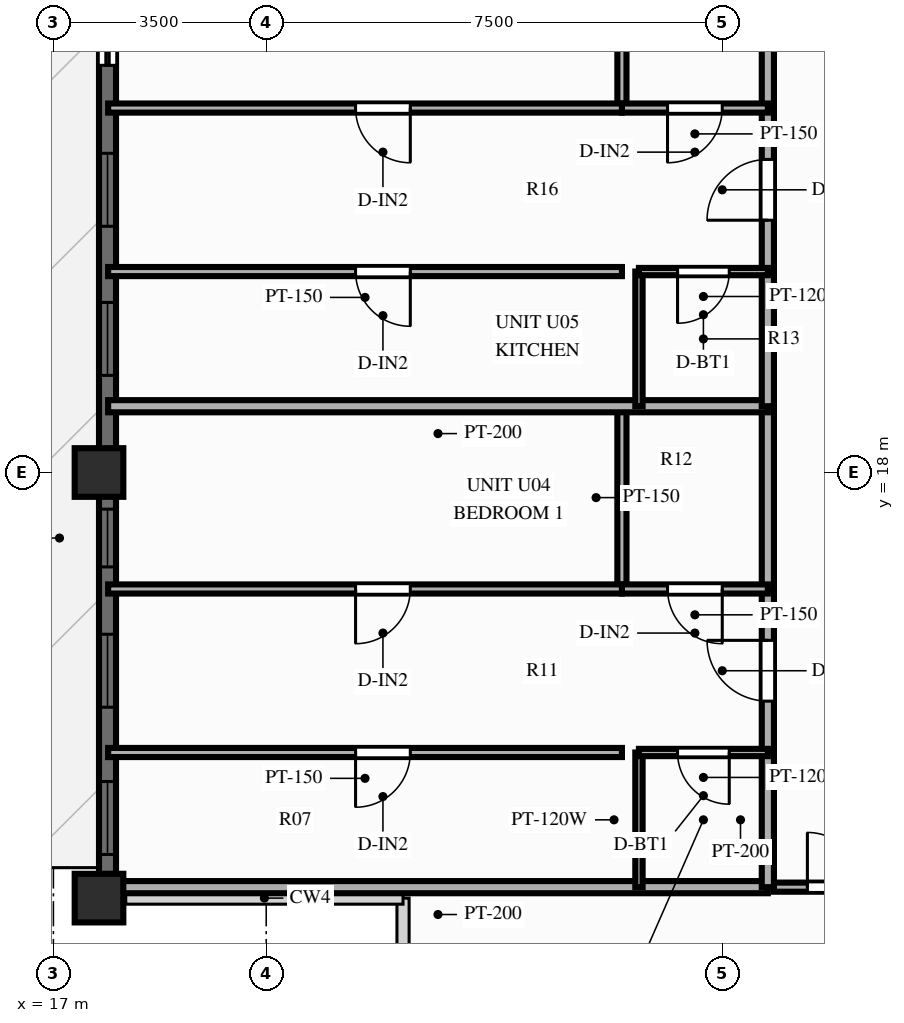
"""IFC4 building model, lengths in metres.
Left out: names, types, materials, properties, quantities, classifications, styles, units other than length and angle.
Written with IfcOpenShell. Run it as: python <this file> out.ifc"""

import sys

from ifc_helpers import new_model, si_unit, direction, frame, frame_2d, origin, origin_2d, place, context, subcontext, project, spatial, rectangle, extrude, source, transform, mapped, element, fill, save


model = new_model("IFC4")
c1 = context("Model", 3, precision=1e-05, world=origin(), true_north=direction((0.0, 1.0)))
c2 = subcontext(c1, "Body", "Model", "MODEL_VIEW")
j1 = project(units=[si_unit("LENGTHUNIT", "METRE"), si_unit("PLANEANGLEUNIT", "RADIAN")], contexts=[c1])
p1 = place(None, origin())
s1 = spatial("IfcSite", under=j1, at=p1, CompositionType="ELEMENT")
p2 = place(p1, origin())
s2 = spatial("IfcBuilding", under=s1, at=p2, CompositionType="ELEMENT")
p3 = place(p2, frame((0.0, 0.0, 186.7)))
s3 = spatial("IfcBuildingStorey", under=s2, at=p3, CompositionType="ELEMENT", Elevation=186.7)
m1 = source(origin(), c2, "Body", "SweptSolid", [
    extrude(rectangle(XDim=0.8, YDim=0.8, at=origin_2d()), origin(), (0.0, 0.0, 1.0), 3.0),
])
for number, where, z_axis, x_axis in (
    (1, (17.75, 18.0, 0.0), (0.0, 0.0, 1.0), (1.0, 0.0, 0.0)),
    (2, (17.75, 11.0, 0.0), (0.0, 0.0, 1.0), (1.0, 0.0, 0.0)),
):
    element("IfcColumn", number, at=place(p3, frame(where, z_axis=z_axis, x_axis=x_axis)), inside=s3, PredefinedType="COLUMN", context=c2, shape_type="MappedRepresentation", body=[
        mapped(m1, transform((0.0, 0.0, 0.0), scale=1.0)),
    ])
p4 = place(p3, frame((17.89, 11.0, 0.0), z_axis=(0.0, 0.0, 1.0), x_axis=(0.0, 1.0, 0.0)))
e3 = element("IfcWall", 3, at=p4, inside=s3, PredefinedType="SOLIDWALL", context=c2, shape_type="SweptSolid", body=[
    extrude(rectangle(XDim=32.0, YDim=0.28, at=frame_2d((16.0, 0.0))), origin(), (0.0, 0.0, 1.0), 2.28),
])
p5 = place(p4, frame((0.717, 0.0, 0.25)))
e4 = element("IfcOpeningElement", 4, at=p5, cuts=e3, PredefinedType="OPENING", context=c2, shape_type="SweptSolid", body=[
    extrude(rectangle(XDim=1.2, YDim=1.5, at=frame_2d((0.6, 0.75))), frame((0.0, 0.152, 0.0), z_axis=(0.0, -1.0, 0.0), x_axis=(1.0, 0.0, 0.0)), (0.0, 0.0, 1.0), 0.304),
])
p6 = place(p4, frame((3.139, 0.0, 0.25)))
e5 = element("IfcOpeningElement", 5, at=p6, cuts=e3, PredefinedType="OPENING", context=c2, shape_type="SweptSolid", body=[
    extrude(rectangle(XDim=1.2, YDim=1.5, at=frame_2d((0.6, 0.75))), frame((0.0, 0.152, 0.0), z_axis=(0.0, -1.0, 0.0), x_axis=(1.0, 0.0, 0.0)), (0.0, 0.0, 1.0), 0.304),
])
p7 = place(p4, frame((5.447, 0.0, 0.25)))
e6 = element("IfcOpeningElement", 6, at=p7, cuts=e3, PredefinedType="OPENING", context=c2, shape_type="SweptSolid", body=[
    extrude(rectangle(XDim=0.95, YDim=1.5, at=frame_2d((0.475, 0.75))), frame((0.0, 0.152, 0.0), z_axis=(0.0, -1.0, 0.0), x_axis=(1.0, 0.0, 0.0)), (0.0, 0.0, 1.0), 0.304),
])
p8 = place(p4, frame((8.597, 0.0, 0.25)))
e7 = element("IfcOpeningElement", 7, at=p8, cuts=e3, PredefinedType="OPENING", context=c2, shape_type="SweptSolid", body=[
    extrude(rectangle(XDim=1.2, YDim=1.5, at=frame_2d((0.6, 0.75))), frame((0.0, 0.152, 0.0), z_axis=(0.0, -1.0, 0.0), x_axis=(1.0, 0.0, 0.0)), (0.0, 0.0, 1.0), 0.304),
])
p9 = place(p4, frame((11.05, 0.0, 0.25)))
e8 = element("IfcOpeningElement", 8, at=p9, cuts=e3, PredefinedType="OPENING", context=c2, shape_type="SweptSolid", body=[
    extrude(rectangle(XDim=1.2, YDim=1.5, at=frame_2d((0.6, 0.75))), frame((0.0, 0.152, 0.0), z_axis=(0.0, -1.0, 0.0), x_axis=(1.0, 0.0, 0.0)), (0.0, 0.0, 1.0), 0.304),
])
p10 = place(p4, frame((13.697, 0.0, 0.0)))
e9 = element("IfcOpeningElement", 9, at=p10, cuts=e3, PredefinedType="OPENING", context=c2, shape_type="SweptSolid", body=[
    extrude(rectangle(XDim=1.6, YDim=2.15, at=frame_2d((0.8, 1.075))), frame((0.0, 0.152, 0.0), z_axis=(0.0, -1.0, 0.0), x_axis=(1.0, 0.0, 0.0)), (0.0, 0.0, 1.0), 0.304),
])
p11 = place(p4, frame((16.507, 0.0, 0.25)))
e10 = element("IfcOpeningElement", 10, at=p11, cuts=e3, PredefinedType="OPENING", context=c2, shape_type="SweptSolid", body=[
    extrude(rectangle(XDim=1.2, YDim=1.5, at=frame_2d((0.6, 0.75))), frame((0.0, 0.152, 0.0), z_axis=(0.0, -1.0, 0.0), x_axis=(1.0, 0.0, 0.0)), (0.0, 0.0, 1.0), 0.304),
])
p12 = place(p4, frame((18.959, 0.0, 0.25)))
e11 = element("IfcOpeningElement", 11, at=p12, cuts=e3, PredefinedType="OPENING", context=c2, shape_type="SweptSolid", body=[
    extrude(rectangle(XDim=1.2, YDim=1.5, at=frame_2d((0.6, 0.75))), frame((0.0, 0.152, 0.0), z_axis=(0.0, -1.0, 0.0), x_axis=(1.0, 0.0, 0.0)), (0.0, 0.0, 1.0), 0.304),
])
p13 = place(p4, frame((21.807, 0.0, 0.25)))
e12 = element("IfcOpeningElement", 12, at=p13, cuts=e3, PredefinedType="OPENING", context=c2, shape_type="SweptSolid", body=[
    extrude(rectangle(XDim=1.2, YDim=1.5, at=frame_2d((0.6, 0.75))), frame((0.0, 0.152, 0.0), z_axis=(0.0, -1.0, 0.0), x_axis=(1.0, 0.0, 0.0)), (0.0, 0.0, 1.0), 0.304),
])
p14 = place(p4, frame((26.967, 0.0, 0.25)))
e13 = element("IfcOpeningElement", 13, at=p14, cuts=e3, PredefinedType="OPENING", context=c2, shape_type="SweptSolid", body=[
    extrude(rectangle(XDim=1.2, YDim=1.5, at=frame_2d((0.6, 0.75))), frame((0.0, 0.152, 0.0), z_axis=(0.0, -1.0, 0.0), x_axis=(1.0, 0.0, 0.0)), (0.0, 0.0, 1.0), 0.304),
])
p15 = place(p4, frame((29.687, 0.0, 0.25)))
e14 = element("IfcOpeningElement", 14, at=p15, cuts=e3, PredefinedType="OPENING", context=c2, shape_type="SweptSolid", body=[
    extrude(rectangle(XDim=1.2, YDim=1.5, at=frame_2d((0.6, 0.75))), frame((0.0, 0.152, 0.0), z_axis=(0.0, -1.0, 0.0), x_axis=(1.0, 0.0, 0.0)), (0.0, 0.0, 1.0), 0.304),
])
p16 = place(p3, frame((28.85, 11.18, 0.0), z_axis=(0.0, 0.0, 1.0), x_axis=(1.0, 0.0, 0.0)))
e15 = element("IfcWall", 15, at=p16, inside=s3, PredefinedType="PARTITIONING", context=c2, shape_type="SweptSolid", body=[
    extrude(rectangle(XDim=2.33, YDim=0.15, at=frame_2d((1.165, 0.0))), origin(), (0.0, 0.0, 1.0), 2.79),
])
p17 = place(p16, frame((0.55, 0.0, 0.0)))
e16 = element("IfcOpeningElement", 16, at=p17, cuts=e15, PredefinedType="OPENING", context=c2, shape_type="SweptSolid", body=[
    extrude(rectangle(XDim=0.9, YDim=2.1, at=frame_2d((0.45, 1.05))), frame((0.0, 0.087, 0.0), z_axis=(0.0, -1.0, 0.0), x_axis=(1.0, 0.0, 0.0)), (0.0, 0.0, 1.0), 0.174),
])
p18 = place(p3, frame((28.75, 11.18, 0.0), z_axis=(0.0, 0.0, 1.0), x_axis=(-1.0, 0.0, 0.0)))
e17 = element("IfcWall", 17, at=p18, inside=s3, PredefinedType="PARTITIONING", context=c2, shape_type="SweptSolid", body=[
    extrude(rectangle(XDim=10.85, YDim=0.2, at=frame_2d((5.425, 0.0))), origin(), (0.0, 0.0, 1.0), 2.79),
])
p19 = place(p3, frame((28.75, 11.18, 0.0), z_axis=(0.0, 0.0, 1.0), x_axis=(0.0, 1.0, 0.0)))
e18 = element("IfcWall", 18, at=p19, inside=s3, PredefinedType="PARTITIONING", context=c2, shape_type="SweptSolid", body=[
    extrude(rectangle(XDim=2.215, YDim=0.2, at=frame_2d((1.107, 0.0))), origin(), (0.0, 0.0, 1.0), 2.79),
])
p20 = place(p3, frame((28.75, 13.395, 0.0), z_axis=(0.0, 0.0, 1.0), x_axis=(0.0, 1.0, 0.0)))
e19 = element("IfcWall", 19, at=p20, inside=s3, PredefinedType="PARTITIONING", context=c2, shape_type="SweptSolid", body=[
    extrude(rectangle(XDim=2.689, YDim=0.2, at=frame_2d((1.345, 0.0))), origin(), (0.0, 0.0, 1.0), 2.79),
])
p21 = place(p20, frame((0.845, 0.0, 0.0)))
e20 = element("IfcOpeningElement", 20, at=p21, cuts=e19, PredefinedType="OPENING", context=c2, shape_type="SweptSolid", body=[
    extrude(rectangle(XDim=1.0, YDim=2.15, at=frame_2d((0.5, 1.075))), frame((0.0, 0.112, 0.0), z_axis=(0.0, -1.0, 0.0), x_axis=(1.0, 0.0, 0.0)), (0.0, 0.0, 1.0), 0.224),
])
p22 = place(p3, frame((28.75, 16.084, 0.0), z_axis=(0.0, 0.0, 1.0), x_axis=(0.0, 1.0, 0.0)))
e21 = element("IfcWall", 21, at=p22, inside=s3, PredefinedType="PARTITIONING", context=c2, shape_type="SweptSolid", body=[
    extrude(rectangle(XDim=3.006, YDim=0.2, at=frame_2d((1.503, 0.0))), origin(), (0.0, 0.0, 1.0), 2.79),
])
p23 = place(p3, frame((26.63, 11.18, 0.0), z_axis=(0.0, 0.0, 1.0), x_axis=(0.0, 1.0, 0.0)))
e22 = element("IfcWall", 22, at=p23, inside=s3, PredefinedType="PARTITIONING", context=c2, shape_type="SweptSolid", body=[
    extrude(rectangle(XDim=2.215, YDim=0.12, at=frame_2d((1.107, 0.0))), origin(), (0.0, 0.0, 1.0), 2.79),
])
p24 = place(p3, frame((26.35, 16.084, 0.0), z_axis=(0.0, 0.0, 1.0), x_axis=(0.0, 1.0, 0.0)))
e23 = element("IfcWall", 23, at=p24, inside=s3, PredefinedType="PARTITIONING", context=c2, shape_type="SweptSolid", body=[
    extrude(rectangle(XDim=3.006, YDim=0.15, at=frame_2d((1.503, 0.0))), origin(), (0.0, 0.0, 1.0), 2.79),
])
p25 = place(p3, frame((28.75, 13.395, 0.0), z_axis=(0.0, 0.0, 1.0), x_axis=(-1.0, 0.0, 0.0)))
e24 = element("IfcWall", 24, at=p25, inside=s3, PredefinedType="PARTITIONING", context=c2, shape_type="SweptSolid", body=[
    extrude(rectangle(XDim=2.12, YDim=0.12, at=frame_2d((1.06, 0.0))), origin(), (0.0, 0.0, 1.0), 2.79),
])
p26 = place(p25, frame((0.635, 0.0, 0.0)))
e25 = element("IfcOpeningElement", 25, at=p26, cuts=e24, PredefinedType="OPENING", context=c2, shape_type="SweptSolid", body=[
    extrude(rectangle(XDim=0.85, YDim=2.05, at=frame_2d((0.425, 1.025))), frame((0.0, 0.072, 0.0), z_axis=(0.0, -1.0, 0.0), x_axis=(1.0, 0.0, 0.0)), (0.0, 0.0, 1.0), 0.144),
])
p27 = place(p3, frame((26.35, 13.395, 0.0), z_axis=(0.0, 0.0, 1.0), x_axis=(-1.0, 0.0, 0.0)))
e26 = element("IfcWall", 26, at=p27, inside=s3, PredefinedType="PARTITIONING", context=c2, shape_type="SweptSolid", body=[
    extrude(rectangle(XDim=8.45, YDim=0.15, at=frame_2d((4.225, 0.0))), origin(), (0.0, 0.0, 1.0), 2.79),
])
p28 = place(p27, frame((3.48, 0.0, 0.0)))
e27 = element("IfcOpeningElement", 27, at=p28, cuts=e26, PredefinedType="OPENING", context=c2, shape_type="SweptSolid", body=[
    extrude(rectangle(XDim=0.9, YDim=2.1, at=frame_2d((0.45, 1.05))), frame((0.0, 0.087, 0.0), z_axis=(0.0, -1.0, 0.0), x_axis=(1.0, 0.0, 0.0)), (0.0, 0.0, 1.0), 0.174),
])
p29 = place(p3, frame((28.75, 16.084, 0.0), z_axis=(0.0, 0.0, 1.0), x_axis=(-1.0, 0.0, 0.0)))
e28 = element("IfcWall", 28, at=p29, inside=s3, PredefinedType="PARTITIONING", context=c2, shape_type="SweptSolid", body=[
    extrude(rectangle(XDim=2.4, YDim=0.15, at=frame_2d((1.2, 0.0))), origin(), (0.0, 0.0, 1.0), 2.79),
])
p30 = place(p29, frame((0.75, 0.0, 0.0)))
e29 = element("IfcOpeningElement", 29, at=p30, cuts=e28, PredefinedType="OPENING", context=c2, shape_type="SweptSolid", body=[
    extrude(rectangle(XDim=0.9, YDim=2.1, at=frame_2d((0.45, 1.05))), frame((0.0, 0.087, 0.0), z_axis=(0.0, -1.0, 0.0), x_axis=(1.0, 0.0, 0.0)), (0.0, 0.0, 1.0), 0.174),
])
p31 = place(p3, frame((26.35, 16.084, 0.0), z_axis=(0.0, 0.0, 1.0), x_axis=(-1.0, 0.0, 0.0)))
e30 = element("IfcWall", 30, at=p31, inside=s3, PredefinedType="PARTITIONING", context=c2, shape_type="SweptSolid", body=[
    extrude(rectangle(XDim=8.45, YDim=0.15, at=frame_2d((4.225, 0.0))), origin(), (0.0, 0.0, 1.0), 2.79),
])
p32 = place(p31, frame((3.48, 0.0, 0.0)))
e31 = element("IfcOpeningElement", 31, at=p32, cuts=e30, PredefinedType="OPENING", context=c2, shape_type="SweptSolid", body=[
    extrude(rectangle(XDim=0.9, YDim=2.1, at=frame_2d((0.45, 1.05))), frame((0.0, 0.087, 0.0), z_axis=(0.0, -1.0, 0.0), x_axis=(1.0, 0.0, 0.0)), (0.0, 0.0, 1.0), 0.174),
])
p33 = place(p3, frame((28.75, 19.09, 0.0), z_axis=(0.0, 0.0, 1.0), x_axis=(-1.0, 0.0, 0.0)))
e32 = element("IfcWall", 32, at=p33, inside=s3, PredefinedType="PARTITIONING", context=c2, shape_type="SweptSolid", body=[
    extrude(rectangle(XDim=10.85, YDim=0.2, at=frame_2d((5.425, 0.0))), origin(), (0.0, 0.0, 1.0), 2.79),
])
p34 = place(p3, frame((28.75, 19.09, 0.0), z_axis=(0.0, 0.0, 1.0), x_axis=(0.0, 1.0, 0.0)))
e33 = element("IfcWall", 33, at=p34, inside=s3, PredefinedType="PARTITIONING", context=c2, shape_type="SweptSolid", body=[
    extrude(rectangle(XDim=2.215, YDim=0.2, at=frame_2d((1.107, 0.0))), origin(), (0.0, 0.0, 1.0), 2.79),
])
p35 = place(p3, frame((28.75, 21.305, 0.0), z_axis=(0.0, 0.0, 1.0), x_axis=(0.0, 1.0, 0.0)))
e34 = element("IfcWall", 34, at=p35, inside=s3, PredefinedType="PARTITIONING", context=c2, shape_type="SweptSolid", body=[
    extrude(rectangle(XDim=2.689, YDim=0.2, at=frame_2d((1.345, 0.0))), origin(), (0.0, 0.0, 1.0), 2.79),
])
p36 = place(p35, frame((0.845, 0.0, 0.0)))
e35 = element("IfcOpeningElement", 35, at=p36, cuts=e34, PredefinedType="OPENING", context=c2, shape_type="SweptSolid", body=[
    extrude(rectangle(XDim=1.0, YDim=2.15, at=frame_2d((0.5, 1.075))), frame((0.0, 0.112, 0.0), z_axis=(0.0, -1.0, 0.0), x_axis=(1.0, 0.0, 0.0)), (0.0, 0.0, 1.0), 0.224),
])
p37 = place(p3, frame((28.75, 23.994, 0.0), z_axis=(0.0, 0.0, 1.0), x_axis=(0.0, 1.0, 0.0)))
e36 = element("IfcWall", 36, at=p37, inside=s3, PredefinedType="PARTITIONING", context=c2, shape_type="SweptSolid", body=[
    extrude(rectangle(XDim=3.006, YDim=0.2, at=frame_2d((1.503, 0.0))), origin(), (0.0, 0.0, 1.0), 2.79),
])
p38 = place(p3, frame((26.63, 19.09, 0.0), z_axis=(0.0, 0.0, 1.0), x_axis=(0.0, 1.0, 0.0)))
e37 = element("IfcWall", 37, at=p38, inside=s3, PredefinedType="PARTITIONING", context=c2, shape_type="SweptSolid", body=[
    extrude(rectangle(XDim=2.215, YDim=0.12, at=frame_2d((1.107, 0.0))), origin(), (0.0, 0.0, 1.0), 2.79),
])
p39 = place(p3, frame((26.35, 23.994, 0.0), z_axis=(0.0, 0.0, 1.0), x_axis=(0.0, 1.0, 0.0)))
e38 = element("IfcWall", 38, at=p39, inside=s3, PredefinedType="PARTITIONING", context=c2, shape_type="SweptSolid", body=[
    extrude(rectangle(XDim=3.006, YDim=0.15, at=frame_2d((1.503, 0.0))), origin(), (0.0, 0.0, 1.0), 2.79),
])
p40 = place(p3, frame((28.75, 21.305, 0.0), z_axis=(0.0, 0.0, 1.0), x_axis=(-1.0, 0.0, 0.0)))
e39 = element("IfcWall", 39, at=p40, inside=s3, PredefinedType="PARTITIONING", context=c2, shape_type="SweptSolid", body=[
    extrude(rectangle(XDim=2.12, YDim=0.12, at=frame_2d((1.06, 0.0))), origin(), (0.0, 0.0, 1.0), 2.79),
])
p41 = place(p40, frame((0.635, 0.0, 0.0)))
e40 = element("IfcOpeningElement", 40, at=p41, cuts=e39, PredefinedType="OPENING", context=c2, shape_type="SweptSolid", body=[
    extrude(rectangle(XDim=0.85, YDim=2.05, at=frame_2d((0.425, 1.025))), frame((0.0, 0.072, 0.0), z_axis=(0.0, -1.0, 0.0), x_axis=(1.0, 0.0, 0.0)), (0.0, 0.0, 1.0), 0.144),
])
p42 = place(p3, frame((26.35, 21.305, 0.0), z_axis=(0.0, 0.0, 1.0), x_axis=(-1.0, 0.0, 0.0)))
e41 = element("IfcWall", 41, at=p42, inside=s3, PredefinedType="PARTITIONING", context=c2, shape_type="SweptSolid", body=[
    extrude(rectangle(XDim=8.45, YDim=0.15, at=frame_2d((4.225, 0.0))), origin(), (0.0, 0.0, 1.0), 2.79),
])
p43 = place(p42, frame((3.48, 0.0, 0.0)))
e42 = element("IfcOpeningElement", 42, at=p43, cuts=e41, PredefinedType="OPENING", context=c2, shape_type="SweptSolid", body=[
    extrude(rectangle(XDim=0.9, YDim=2.1, at=frame_2d((0.45, 1.05))), frame((0.0, 0.087, 0.0), z_axis=(0.0, -1.0, 0.0), x_axis=(1.0, 0.0, 0.0)), (0.0, 0.0, 1.0), 0.174),
])
p44 = place(p3, frame((28.75, 23.994, 0.0), z_axis=(0.0, 0.0, 1.0), x_axis=(-1.0, 0.0, 0.0)))
e43 = element("IfcWall", 43, at=p44, inside=s3, PredefinedType="PARTITIONING", context=c2, shape_type="SweptSolid", body=[
    extrude(rectangle(XDim=2.4, YDim=0.15, at=frame_2d((1.2, 0.0))), origin(), (0.0, 0.0, 1.0), 2.79),
])
p45 = place(p44, frame((0.75, 0.0, 0.0)))
e44 = element("IfcOpeningElement", 44, at=p45, cuts=e43, PredefinedType="OPENING", context=c2, shape_type="SweptSolid", body=[
    extrude(rectangle(XDim=0.9, YDim=2.1, at=frame_2d((0.45, 1.05))), frame((0.0, 0.087, 0.0), z_axis=(0.0, -1.0, 0.0), x_axis=(1.0, 0.0, 0.0)), (0.0, 0.0, 1.0), 0.174),
])
p46 = place(p3, frame((26.35, 23.994, 0.0), z_axis=(0.0, 0.0, 1.0), x_axis=(-1.0, 0.0, 0.0)))
e45 = element("IfcWall", 45, at=p46, inside=s3, PredefinedType="PARTITIONING", context=c2, shape_type="SweptSolid", body=[
    extrude(rectangle(XDim=8.45, YDim=0.15, at=frame_2d((4.225, 0.0))), origin(), (0.0, 0.0, 1.0), 2.79),
])
p47 = place(p46, frame((3.48, 0.0, 0.0)))
e46 = element("IfcOpeningElement", 46, at=p47, cuts=e45, PredefinedType="OPENING", context=c2, shape_type="SweptSolid", body=[
    extrude(rectangle(XDim=0.9, YDim=2.1, at=frame_2d((0.45, 1.05))), frame((0.0, 0.087, 0.0), z_axis=(0.0, -1.0, 0.0), x_axis=(1.0, 0.0, 0.0)), (0.0, 0.0, 1.0), 0.174),
])
m2 = source(origin(), c2, "Body", "SweptSolid", [
    extrude(rectangle(XDim=1.2, YDim=1.5, at=frame_2d((0.6, 0.75))), frame((0.0, 0.03, 0.0), z_axis=(0.0, -1.0, 0.0), x_axis=(1.0, 0.0, 0.0)), (0.0, 0.0, 1.0), 0.06),
])
p48 = place(p5, origin())
e47 = element("IfcWindow", 47, at=p48, inside=s3, PartitioningType="SINGLE_PANEL", PredefinedType="WINDOW", context=c2, shape_type="MappedRepresentation", body=[
    mapped(m2, transform((0.0, 0.0, 0.0), scale=1.0)),
])
fill(e4, e47)
p49 = place(p6, origin())
e48 = element("IfcWindow", 48, at=p49, inside=s3, PartitioningType="SINGLE_PANEL", PredefinedType="WINDOW", context=c2, shape_type="MappedRepresentation", body=[
    mapped(m2, transform((0.0, 0.0, 0.0), scale=1.0)),
])
fill(e5, e48)
m3 = source(origin(), c2, "Body", "SweptSolid", [
    extrude(rectangle(XDim=0.95, YDim=1.5, at=frame_2d((0.475, 0.75))), frame((0.0, 0.03, 0.0), z_axis=(0.0, -1.0, 0.0), x_axis=(1.0, 0.0, 0.0)), (0.0, 0.0, 1.0), 0.06),
])
p50 = place(p7, origin())
e49 = element("IfcWindow", 49, at=p50, inside=s3, PartitioningType="SINGLE_PANEL", PredefinedType="WINDOW", context=c2, shape_type="MappedRepresentation", body=[
    mapped(m3, transform((0.0, 0.0, 0.0), scale=1.0)),
])
fill(e6, e49)
p51 = place(p8, origin())
e50 = element("IfcWindow", 50, at=p51, inside=s3, PartitioningType="SINGLE_PANEL", PredefinedType="WINDOW", context=c2, shape_type="MappedRepresentation", body=[
    mapped(m2, transform((0.0, 0.0, 0.0), scale=1.0)),
])
fill(e7, e50)
p52 = place(p9, origin())
e51 = element("IfcWindow", 51, at=p52, inside=s3, PartitioningType="SINGLE_PANEL", PredefinedType="WINDOW", context=c2, shape_type="MappedRepresentation", body=[
    mapped(m2, transform((0.0, 0.0, 0.0), scale=1.0)),
])
fill(e8, e51)
m4 = source(origin(), c2, "Body", "SweptSolid", [
    extrude(rectangle(XDim=1.6, YDim=2.15, at=frame_2d((0.8, 1.075))), frame((0.0, 0.025, 0.0), z_axis=(0.0, -1.0, 0.0), x_axis=(1.0, 0.0, 0.0)), (0.0, 0.0, 1.0), 0.05),
])
p53 = place(p10, origin())
e52 = element("IfcDoor", 52, at=p53, inside=s3, OperationType="SLIDING_TO_LEFT", PredefinedType="DOOR", context=c2, shape_type="MappedRepresentation", body=[
    mapped(m4, transform((0.0, 0.0, 0.0), scale=1.0)),
])
fill(e9, e52)
m5 = source(origin(), c2, "Body", "SweptSolid", [
    extrude(rectangle(XDim=0.9, YDim=2.1, at=frame_2d((0.45, 1.05))), frame((0.0, 0.025, 0.0), z_axis=(0.0, -1.0, 0.0), x_axis=(1.0, 0.0, 0.0)), (0.0, 0.0, 1.0), 0.05),
])
p54 = place(p17, origin())
e53 = element("IfcDoor", 53, at=p54, inside=s3, OperationType="SINGLE_SWING_LEFT", PredefinedType="DOOR", context=c2, shape_type="MappedRepresentation", body=[
    mapped(m5, transform((0.0, 0.0, 0.0), scale=1.0)),
])
fill(e16, e53)
m6 = source(origin(), c2, "Body", "SweptSolid", [
    extrude(rectangle(XDim=1.0, YDim=2.15, at=frame_2d((0.5, 1.075))), frame((0.0, 0.025, 0.0), z_axis=(0.0, -1.0, 0.0), x_axis=(1.0, 0.0, 0.0)), (0.0, 0.0, 1.0), 0.05),
])
p55 = place(p21, origin())
e54 = element("IfcDoor", 54, at=p55, inside=s3, OperationType="SINGLE_SWING_RIGHT", PredefinedType="DOOR", context=c2, shape_type="MappedRepresentation", body=[
    mapped(m6, transform((0.0, 0.0, 0.0), scale=1.0)),
])
fill(e20, e54)
m7 = source(origin(), c2, "Body", "SweptSolid", [
    extrude(rectangle(XDim=0.85, YDim=2.05, at=frame_2d((0.425, 1.025))), frame((0.0, 0.025, 0.0), z_axis=(0.0, -1.0, 0.0), x_axis=(1.0, 0.0, 0.0)), (0.0, 0.0, 1.0), 0.05),
])
p56 = place(p26, origin())
e55 = element("IfcDoor", 55, at=p56, inside=s3, OperationType="SINGLE_SWING_LEFT", PredefinedType="DOOR", context=c2, shape_type="MappedRepresentation", body=[
    mapped(m7, transform((0.0, 0.0, 0.0), scale=1.0)),
])
fill(e25, e55)
p57 = place(p28, origin())
e56 = element("IfcDoor", 56, at=p57, inside=s3, OperationType="SINGLE_SWING_RIGHT", PredefinedType="DOOR", context=c2, shape_type="MappedRepresentation", body=[
    mapped(m5, transform((0.0, 0.0, 0.0), scale=1.0)),
])
fill(e27, e56)
p58 = place(p30, origin())
e57 = element("IfcDoor", 57, at=p58, inside=s3, OperationType="SINGLE_SWING_LEFT", PredefinedType="DOOR", context=c2, shape_type="MappedRepresentation", body=[
    mapped(m5, transform((0.0, 0.0, 0.0), scale=1.0)),
])
fill(e29, e57)
p59 = place(p32, origin())
e58 = element("IfcDoor", 58, at=p59, inside=s3, OperationType="SINGLE_SWING_RIGHT", PredefinedType="DOOR", context=c2, shape_type="MappedRepresentation", body=[
    mapped(m5, transform((0.0, 0.0, 0.0), scale=1.0)),
])
fill(e31, e58)
p60 = place(p36, origin())
e59 = element("IfcDoor", 59, at=p60, inside=s3, OperationType="SINGLE_SWING_LEFT", PredefinedType="DOOR", context=c2, shape_type="MappedRepresentation", body=[
    mapped(m6, transform((0.0, 0.0, 0.0), scale=1.0)),
])
fill(e35, e59)
p61 = place(p41, origin())
e60 = element("IfcDoor", 60, at=p61, inside=s3, OperationType="SINGLE_SWING_RIGHT", PredefinedType="DOOR", context=c2, shape_type="MappedRepresentation", body=[
    mapped(m7, transform((0.0, 0.0, 0.0), scale=1.0)),
])
fill(e40, e60)
p62 = place(p43, origin())
e61 = element("IfcDoor", 61, at=p62, inside=s3, OperationType="SINGLE_SWING_LEFT", PredefinedType="DOOR", context=c2, shape_type="MappedRepresentation", body=[
    mapped(m5, transform((0.0, 0.0, 0.0), scale=1.0)),
])
fill(e42, e61)
p63 = place(p45, origin())
e62 = element("IfcDoor", 62, at=p63, inside=s3, OperationType="SINGLE_SWING_RIGHT", PredefinedType="DOOR", context=c2, shape_type="MappedRepresentation", body=[
    mapped(m5, transform((0.0, 0.0, 0.0), scale=1.0)),
])
fill(e44, e62)
p64 = place(p47, origin())
e63 = element("IfcDoor", 63, at=p64, inside=s3, OperationType="SINGLE_SWING_LEFT", PredefinedType="DOOR", context=c2, shape_type="MappedRepresentation", body=[
    mapped(m5, transform((0.0, 0.0, 0.0), scale=1.0)),
])
fill(e46, e63)
save(model, sys.argv[1])
